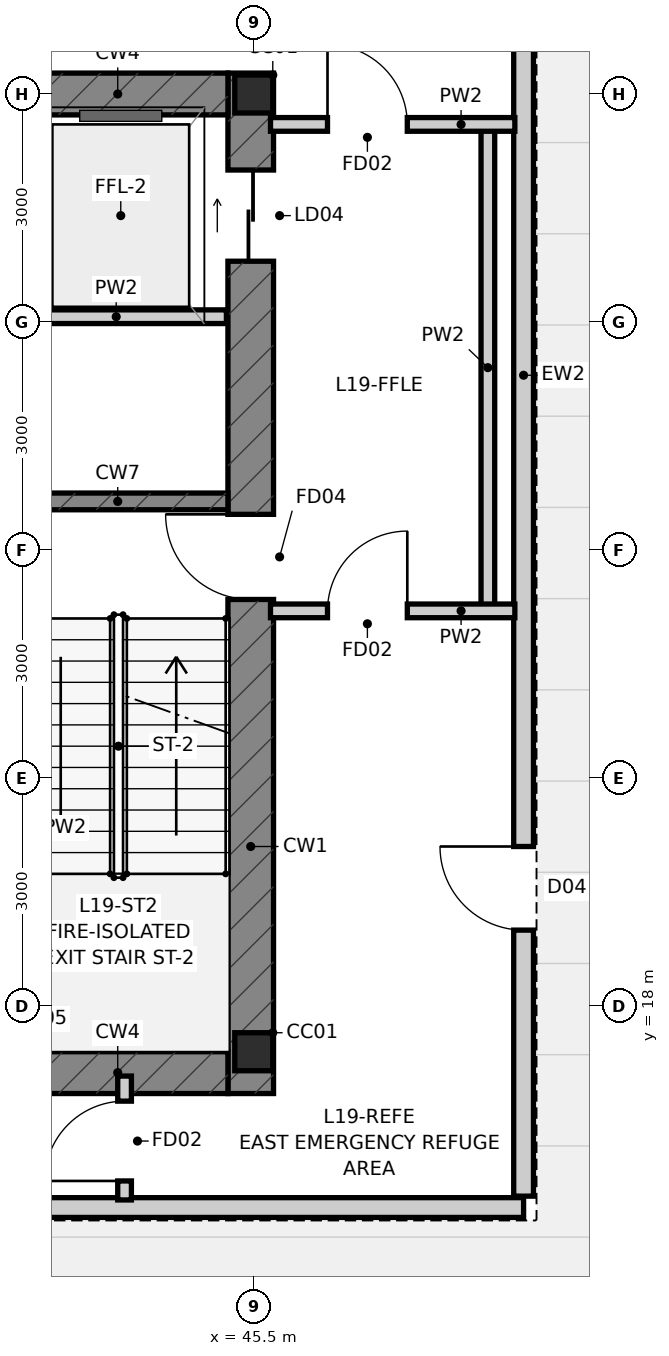
"""IFC4 building model, lengths in metres.
Left out: names, types, materials, properties, quantities, classifications, styles, units other than length and angle.
Written with IfcOpenShell. Run it as: python <this file> out.ifc"""

import sys

from ifc_helpers import new_model, si_unit, direction, frame, frame_2d, origin, origin_2d, place, context, subcontext, project, spatial, rectangle, i_section, extrude, source, transform, mapped, element, fill, save


model = new_model("IFC4")
c1 = context("Model", 3, precision=1e-05, world=origin(), true_north=direction((0.0, 1.0)))
c2 = subcontext(c1, "Body", "Model", "MODEL_VIEW")
j1 = project(units=[si_unit("LENGTHUNIT", "METRE"), si_unit("PLANEANGLEUNIT", "RADIAN")], contexts=[c1])
p1 = place(None, origin())
s1 = spatial("IfcSite", under=j1, at=p1, CompositionType="ELEMENT")
p2 = place(p1, origin())
s2 = spatial("IfcBuilding", under=s1, at=p2, CompositionType="ELEMENT")
p3 = place(p2, frame((0.0, 0.0, 75.05)))
s3 = spatial("IfcBuildingStorey", under=s2, at=p3, CompositionType="ELEMENT", Elevation=75.05)
m1 = source(origin(), c2, "Body", "SweptSolid", [
    extrude(i_section(OverallWidth=0.5, OverallDepth=0.5, WebThickness=0.028, FlangeThickness=0.04, at=origin_2d()), origin(), (0.0, 0.0, 1.0), 4.8),
])
for number, where, z_axis, x_axis in (
    (1, (45.5, 17.4, 0.0), (0.0, 0.0, 1.0), (1.0, 0.0, 0.0)),
    (2, (45.5, 30.0, 0.0), (0.0, 0.0, 1.0), (1.0, 0.0, 0.0)),
):
    element("IfcColumn", number, at=place(p3, frame(where, z_axis=z_axis, x_axis=x_axis)), inside=s3, PredefinedType="COLUMN", context=c2, shape_type="MappedRepresentation", body=[
        mapped(m1, transform((0.0, 0.0, 0.0), scale=1.0)),
    ])
p4 = place(p3, frame((45.46, 16.85, 0.0), z_axis=(0.0, 0.0, 1.0), x_axis=(0.0, 1.0, 0.0)))
e3 = element("IfcWall", 3, at=p4, inside=s3, PredefinedType="SHEAR", context=c2, shape_type="SweptSolid", body=[
    extrude(rectangle(XDim=13.425, YDim=0.6, at=frame_2d((6.712, 0.0))), origin(), (0.0, 0.0, 1.0), 4.8),
])
p5 = place(p4, frame((6.5, 0.0, 0.0)))
e4 = element("IfcOpeningElement", 4, at=p5, cuts=e3, PredefinedType="OPENING", context=c2, shape_type="SweptSolid", body=[
    extrude(rectangle(XDim=1.12, YDim=2.15, at=frame_2d((0.56, 1.075))), frame((0.0, 0.312, 0.0), z_axis=(0.0, -1.0, 0.0), x_axis=(1.0, 0.0, 0.0)), (0.0, 0.0, 1.0), 0.624),
])
p6 = place(p4, frame((10.95, 0.0, 0.0)))
e5 = element("IfcOpeningElement", 5, at=p6, cuts=e3, PredefinedType="OPENING", context=c2, shape_type="SweptSolid", body=[
    extrude(rectangle(XDim=1.2, YDim=2.2, at=frame_2d((0.6, 1.1))), frame((0.0, 0.312, 0.0), z_axis=(0.0, -1.0, 0.0), x_axis=(1.0, 0.0, 0.0)), (0.0, 0.0, 1.0), 0.624),
])
for number, where, z_axis, x_axis in (
    (6, (42.26, 17.125, 0.0), (0.0, 0.0, 1.0), (1.0, 0.0, 0.0)),
    (7, (42.26, 30.0, 0.0), (0.0, 0.0, 1.0), (1.0, 0.0, 0.0)),
):
    element("IfcWall", number, at=place(p3, frame(where, z_axis=z_axis, x_axis=x_axis)), inside=s3, PredefinedType="SHEAR", context=c2, shape_type="SweptSolid", body=[
        extrude(rectangle(XDim=2.9, YDim=0.55, at=frame_2d((1.45, 0.0))), origin(), (0.0, 0.0, 1.0), 4.8),
    ])
p7 = place(p3, frame((42.26, 24.64, 0.0), z_axis=(0.0, 0.0, 1.0), x_axis=(1.0, 0.0, 0.0)))
e8 = element("IfcWall", 8, at=p7, inside=s3, PredefinedType="SHEAR", context=c2, shape_type="SweptSolid", body=[
    extrude(rectangle(XDim=2.9, YDim=0.22, at=frame_2d((1.45, 0.0))), origin(), (0.0, 0.0, 1.0), 4.8),
])
p8 = place(p3, frame((26.95, 15.35, 0.0), z_axis=(0.0, 0.0, 1.0), x_axis=(1.0, 0.0, 0.0)))
e9 = element("IfcWall", 9, at=p8, inside=s3, PredefinedType="STANDARD", context=c2, shape_type="SweptSolid", body=[
    extrude(rectangle(XDim=22.1, YDim=0.26, at=frame_2d((11.05, 0.0))), origin(), (0.0, 0.0, 1.0), 4.176),
])
p9 = place(p3, frame((49.05, 15.5, 0.0), z_axis=(0.0, 0.0, 1.0), x_axis=(0.0, 1.0, 0.0)))
e10 = element("IfcWall", 10, at=p9, inside=s3, PredefinedType="STANDARD", context=c2, shape_type="SweptSolid", body=[
    extrude(rectangle(XDim=17.0, YDim=0.26, at=frame_2d((8.5, 0.0))), origin(), (0.0, 0.0, 1.0), 4.176),
])
p10 = place(p9, frame((3.5, 0.0, 0.0)))
e11 = element("IfcOpeningElement", 11, at=p10, cuts=e10, PredefinedType="OPENING", context=c2, shape_type="SweptSolid", body=[
    extrude(rectangle(XDim=1.1, YDim=2.2, at=frame_2d((0.55, 1.1))), frame((0.0, 0.142, 0.0), z_axis=(0.0, -1.0, 0.0), x_axis=(1.0, 0.0, 0.0)), (0.0, 0.0, 1.0), 0.284),
])
p11 = place(p3, frame((48.58, 23.2, 0.0), z_axis=(0.0, 0.0, 1.0), x_axis=(0.0, 1.0, 0.0)))
e12 = element("IfcWall", 12, at=p11, inside=s3, PredefinedType="PARTITIONING", context=c2, shape_type="SweptSolid", body=[
    extrude(rectangle(XDim=6.4, YDim=0.18, at=frame_2d((3.2, 0.0))), origin(), (0.0, 0.0, 1.0), 4.176),
])
p12 = place(p3, frame((45.72, 23.2, 0.0), z_axis=(0.0, 0.0, 1.0), x_axis=(1.0, 0.0, 0.0)))
e13 = element("IfcWall", 13, at=p12, inside=s3, PredefinedType="PARTITIONING", context=c2, shape_type="SweptSolid", body=[
    extrude(rectangle(XDim=3.215, YDim=0.18, at=frame_2d((1.607, 0.0))), origin(), (0.0, 0.0, 1.0), 4.55),
])
p13 = place(p12, frame((0.75, 0.0, 0.0)))
e14 = element("IfcOpeningElement", 14, at=p13, cuts=e13, PredefinedType="OPENING", context=c2, shape_type="SweptSolid", body=[
    extrude(rectangle(XDim=1.05, YDim=2.15, at=frame_2d((0.525, 1.075))), frame((0.0, 0.102, 0.0), z_axis=(0.0, -1.0, 0.0), x_axis=(1.0, 0.0, 0.0)), (0.0, 0.0, 1.0), 0.204),
])
p14 = place(p3, frame((45.72, 29.6, 0.0), z_axis=(0.0, 0.0, 1.0), x_axis=(1.0, 0.0, 0.0)))
e15 = element("IfcWall", 15, at=p14, inside=s3, PredefinedType="PARTITIONING", context=c2, shape_type="SweptSolid", body=[
    extrude(rectangle(XDim=3.215, YDim=0.18, at=frame_2d((1.607, 0.0))), origin(), (0.0, 0.0, 1.0), 3.933),
])
p15 = place(p14, frame((0.75, 0.0, 0.0)))
e16 = element("IfcOpeningElement", 16, at=p15, cuts=e15, PredefinedType="OPENING", context=c2, shape_type="SweptSolid", body=[
    extrude(rectangle(XDim=1.05, YDim=2.15, at=frame_2d((0.525, 1.075))), frame((0.0, 0.102, 0.0), z_axis=(0.0, -1.0, 0.0), x_axis=(1.0, 0.0, 0.0)), (0.0, 0.0, 1.0), 0.204),
])
p16 = place(p3, frame((42.24, 27.07, 0.0), z_axis=(0.0, 0.0, 1.0), x_axis=(1.0, 0.0, 0.0)))
e17 = element("IfcWall", 17, at=p16, inside=s3, PredefinedType="PARTITIONING", context=c2, shape_type="SweptSolid", body=[
    extrude(rectangle(XDim=2.9, YDim=0.18, at=frame_2d((1.45, 0.0))), origin(), (0.0, 0.0, 1.0), 4.55),
])
p17 = place(p3, frame((43.8, 15.45, 0.0), z_axis=(0.0, 0.0, 1.0), x_axis=(0.0, 1.0, 0.0)))
e18 = element("IfcWall", 18, at=p17, inside=s3, PredefinedType="PARTITIONING", context=c2, shape_type="SweptSolid", body=[
    extrude(rectangle(XDim=1.63, YDim=0.18, at=frame_2d((0.815, 0.0))), origin(), (0.0, 0.0, 1.0), 4.55),
])
p18 = place(p17, frame((0.25, 0.0, 0.0)))
e19 = element("IfcOpeningElement", 19, at=p18, cuts=e18, PredefinedType="OPENING", context=c2, shape_type="SweptSolid", body=[
    extrude(rectangle(XDim=1.05, YDim=2.15, at=frame_2d((0.525, 1.075))), frame((0.0, 0.102, 0.0), z_axis=(0.0, -1.0, 0.0), x_axis=(1.0, 0.0, 0.0)), (0.0, 0.0, 1.0), 0.204),
])
p19 = place(p10, origin())
e20 = element("IfcDoor", 20, at=p19, inside=s3, OperationType="SINGLE_SWING_RIGHT", PredefinedType="DOOR", context=c2, shape_type="SweptSolid", body=[
    extrude(rectangle(XDim=1.1, YDim=2.2, at=frame_2d((0.55, 1.1))), frame((0.0, 0.025, 0.0), z_axis=(0.0, -1.0, 0.0), x_axis=(1.0, 0.0, 0.0)), (0.0, 0.0, 1.0), 0.05),
])
fill(e11, e20)
p20 = place(p5, origin())
e21 = element("IfcDoor", 21, at=p20, inside=s3, OperationType="SINGLE_SWING_RIGHT", PredefinedType="DOOR", context=c2, shape_type="SweptSolid", body=[
    extrude(rectangle(XDim=1.12, YDim=2.15, at=frame_2d((0.56, 1.075))), frame((0.0, 0.025, 0.0), z_axis=(0.0, -1.0, 0.0), x_axis=(1.0, 0.0, 0.0)), (0.0, 0.0, 1.0), 0.05),
])
fill(e4, e21)
p21 = place(p6, origin())
e22 = element("IfcDoor", 22, at=p21, inside=s3, OperationType="SLIDING_TO_RIGHT", PredefinedType="DOOR", context=c2, shape_type="SweptSolid", body=[
    extrude(rectangle(XDim=1.2, YDim=2.2, at=frame_2d((0.6, 1.1))), frame((0.0, 0.025, 0.0), z_axis=(0.0, -1.0, 0.0), x_axis=(1.0, 0.0, 0.0)), (0.0, 0.0, 1.0), 0.05),
])
fill(e5, e22)
p22 = place(p13, origin())
e23 = element("IfcDoor", 23, at=p22, inside=s3, OperationType="SINGLE_SWING_RIGHT", PredefinedType="DOOR", context=c2, shape_type="SweptSolid", body=[
    extrude(rectangle(XDim=1.05, YDim=2.15, at=frame_2d((0.525, 1.075))), frame((0.0, 0.025, 0.0), z_axis=(0.0, -1.0, 0.0), x_axis=(1.0, 0.0, 0.0)), (0.0, 0.0, 1.0), 0.05),
])
fill(e14, e23)
p23 = place(p15, origin())
e24 = element("IfcDoor", 24, at=p23, inside=s3, OperationType="SINGLE_SWING_LEFT", PredefinedType="DOOR", context=c2, shape_type="SweptSolid", body=[
    extrude(rectangle(XDim=1.05, YDim=2.15, at=frame_2d((0.525, 1.075))), frame((0.0, 0.025, 0.0), z_axis=(0.0, -1.0, 0.0), x_axis=(1.0, 0.0, 0.0)), (0.0, 0.0, 1.0), 0.05),
])
fill(e16, e24)
p24 = place(p18, origin())
e25 = element("IfcDoor", 25, at=p24, inside=s3, OperationType="SINGLE_SWING_LEFT", PredefinedType="DOOR", context=c2, shape_type="SweptSolid", body=[
    extrude(rectangle(XDim=1.05, YDim=2.15, at=frame_2d((0.525, 1.075))), frame((0.0, 0.025, 0.0), z_axis=(0.0, -1.0, 0.0), x_axis=(1.0, 0.0, 0.0)), (0.0, 0.0, 1.0), 0.05),
])
fill(e19, e25)
save(model, sys.argv[1])
